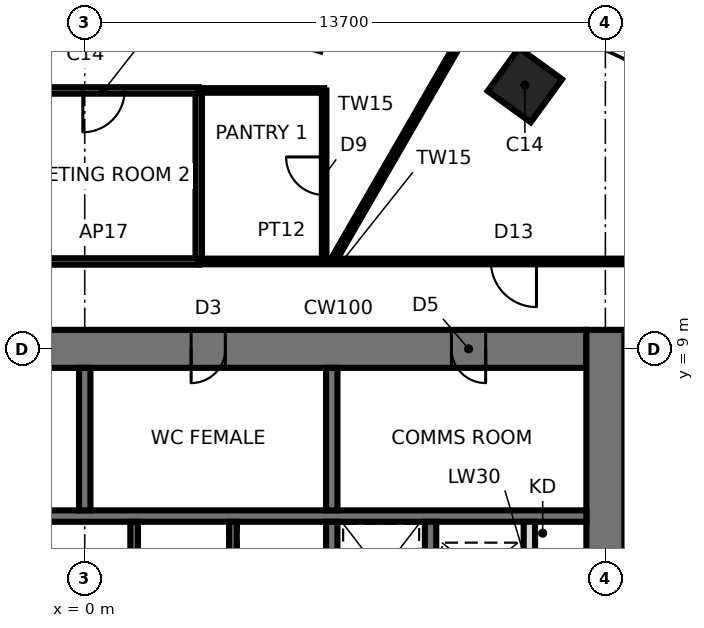
"""IFC4 building model, lengths in metres.
Left out: names, types, materials, properties, quantities, classifications, styles, units other than length and angle.
Written with IfcOpenShell. Run it as: python <this file> out.ifc"""

import sys

from ifc_helpers import new_model, si_unit, direction, frame, frame_2d, origin, origin_2d, place, context, subcontext, project, spatial, rectangle, extrude, element, fill, save


model = new_model("IFC4")
c1 = context("Model", 3, precision=1e-05, world=origin(), true_north=direction((0.0, 1.0)))
c2 = subcontext(c1, "Body", "Model", "MODEL_VIEW")
j1 = project(units=[si_unit("LENGTHUNIT", "METRE"), si_unit("PLANEANGLEUNIT", "RADIAN")], contexts=[c1])
p1 = place(None, origin())
s1 = spatial("IfcSite", under=j1, at=p1, CompositionType="ELEMENT")
p2 = place(p1, origin())
s2 = spatial("IfcBuilding", under=s1, at=p2, CompositionType="ELEMENT")
p3 = place(p2, frame((0.0, 0.0, 195.5)))
s3 = spatial("IfcBuildingStorey", under=s2, at=p3, CompositionType="ELEMENT", Elevation=195.5)
p4 = place(p3, frame((11.581, 15.94, 0.0), z_axis=(0.0, 0.0, 1.0), x_axis=(0.587785252292, 0.809016994375, 0.0)))
e1 = element("IfcColumn", 1, at=p4, inside=s3, PredefinedType="COLUMN", context=c2, shape_type="SweptSolid", body=[
    extrude(rectangle(XDim=1.4, YDim=1.4, at=origin_2d()), origin(), (0.0, 0.0, 1.0), 3.9),
])
p5 = place(p3, frame((13.2, 9.0, 0.0), z_axis=(0.0, 0.0, 1.0), x_axis=(-1.0, 0.0, 0.0)))
e2 = element("IfcWall", 2, at=p5, inside=s3, PredefinedType="SHEAR", context=c2, shape_type="SweptSolid", body=[
    extrude(rectangle(XDim=26.4, YDim=1.0, at=frame_2d((13.2, 0.0))), origin(), (0.0, 0.0, 1.0), 3.9),
])
p6 = place(p5, frame((2.65, 0.0, 0.0)))
e3 = element("IfcOpeningElement", 3, at=p6, cuts=e2, PredefinedType="OPENING", context=c2, shape_type="SweptSolid", body=[
    extrude(rectangle(XDim=0.9, YDim=2.1, at=frame_2d((0.45, 1.05))), frame((0.0, 0.51, 0.0), z_axis=(0.0, -1.0, 0.0), x_axis=(1.0, 0.0, 0.0)), (0.0, 0.0, 1.0), 1.02),
])
p7 = place(p5, frame((9.5, 0.0, 0.0)))
e4 = element("IfcOpeningElement", 4, at=p7, cuts=e2, PredefinedType="OPENING", context=c2, shape_type="SweptSolid", body=[
    extrude(rectangle(XDim=0.9, YDim=2.1, at=frame_2d((0.45, 1.05))), frame((0.0, 0.51, 0.0), z_axis=(0.0, -1.0, 0.0), x_axis=(1.0, 0.0, 0.0)), (0.0, 0.0, 1.0), 1.02),
])
p8 = place(p5, frame((16.0, 0.0, 0.0)))
e5 = element("IfcOpeningElement", 5, at=p8, cuts=e2, PredefinedType="OPENING", context=c2, shape_type="SweptSolid", body=[
    extrude(rectangle(XDim=0.9, YDim=2.1, at=frame_2d((0.45, 1.05))), frame((0.0, 0.51, 0.0), z_axis=(0.0, -1.0, 0.0), x_axis=(1.0, 0.0, 0.0)), (0.0, 0.0, 1.0), 1.02),
])
p9 = place(p5, frame((21.25, 0.0, 0.0)))
e6 = element("IfcOpeningElement", 6, at=p9, cuts=e2, PredefinedType="OPENING", context=c2, shape_type="SweptSolid", body=[
    extrude(rectangle(XDim=0.9, YDim=2.1, at=frame_2d((0.45, 1.05))), frame((0.0, 0.51, 0.0), z_axis=(0.0, -1.0, 0.0), x_axis=(1.0, 0.0, 0.0)), (0.0, 0.0, 1.0), 1.02),
])
p10 = place(p5, frame((24.8, 0.0, 0.0)))
e7 = element("IfcOpeningElement", 7, at=p10, cuts=e2, PredefinedType="OPENING", context=c2, shape_type="SweptSolid", body=[
    extrude(rectangle(XDim=1.0, YDim=2.1, at=frame_2d((0.5, 1.05))), frame((0.0, 0.51, 0.0), z_axis=(0.0, -1.0, 0.0), x_axis=(1.0, 0.0, 0.0)), (0.0, 0.0, 1.0), 1.02),
])
p11 = place(p3, frame((13.7, -9.5, 0.0), z_axis=(0.0, 0.0, 1.0), x_axis=(0.0, 1.0, 0.0)))
e8 = element("IfcWall", 8, at=p11, inside=s3, PredefinedType="SHEAR", context=c2, shape_type="SweptSolid", body=[
    extrude(rectangle(XDim=19.0, YDim=1.0, at=frame_2d((9.5, 0.0))), origin(), (0.0, 0.0, 1.0), 3.9),
])
p12 = place(p11, frame((8.6, 0.0, 0.0)))
e9 = element("IfcOpeningElement", 9, at=p12, cuts=e8, PredefinedType="OPENING", context=c2, shape_type="SweptSolid", body=[
    extrude(rectangle(XDim=1.8, YDim=2.4, at=frame_2d((0.9, 1.2))), frame((0.0, 0.51, 0.0), z_axis=(0.0, -1.0, 0.0), x_axis=(1.0, 0.0, 0.0)), (0.0, 0.0, 1.0), 1.02),
])
p13 = place(p3, frame((-13.2, 4.6, 0.0), z_axis=(0.0, 0.0, 1.0), x_axis=(1.0, 0.0, 0.0)))
e10 = element("IfcWall", 10, at=p13, inside=s3, PredefinedType="SHEAR", context=c2, shape_type="SweptSolid", body=[
    extrude(rectangle(XDim=26.4, YDim=0.3, at=frame_2d((13.2, 0.0))), origin(), (0.0, 0.0, 1.0), 3.9),
])
p14 = place(p3, frame((6.5, 1.75, 0.0), z_axis=(0.0, 0.0, 1.0), x_axis=(0.0, 1.0, 0.0)))
e11 = element("IfcWall", 11, at=p14, inside=s3, PredefinedType="SHEAR", context=c2, shape_type="SweptSolid", body=[
    extrude(rectangle(XDim=2.7, YDim=0.3, at=frame_2d((1.35, 0.0))), origin(), (0.0, 0.0, 1.0), 3.9),
])
p15 = place(p3, frame((6.5, 4.75, 0.0), z_axis=(0.0, 0.0, 1.0), x_axis=(0.0, 1.0, 0.0)))
e12 = element("IfcWall", 12, at=p15, inside=s3, PredefinedType="SHEAR", context=c2, shape_type="SweptSolid", body=[
    extrude(rectangle(XDim=3.75, YDim=0.3, at=frame_2d((1.875, 0.0))), origin(), (0.0, 0.0, 1.0), 3.9),
])
for number, where, z_axis, x_axis in (
    (13, (1.3, 1.75, 0.0), (0.0, 0.0, 1.0), (0.0, 1.0, 0.0)),
    (14, (3.9, 1.75, 0.0), (0.0, 0.0, 1.0), (0.0, 1.0, 0.0)),
):
    element("IfcWall", number, at=place(p3, frame(where, z_axis=z_axis, x_axis=x_axis)), inside=s3, PredefinedType="SHEAR", context=c2, shape_type="SweptSolid", body=[
        extrude(rectangle(XDim=2.7, YDim=0.2, at=frame_2d((1.35, 0.0))), origin(), (0.0, 0.0, 1.0), 3.9),
    ])
p16 = place(p3, frame((0.0, 4.75, 0.0), z_axis=(0.0, 0.0, 1.0), x_axis=(0.0, 1.0, 0.0)))
e15 = element("IfcWall", 15, at=p16, inside=s3, PredefinedType="SHEAR", context=c2, shape_type="SweptSolid", body=[
    extrude(rectangle(XDim=3.75, YDim=0.3, at=frame_2d((1.875, 0.0))), origin(), (0.0, 0.0, 1.0), 3.9),
])
p17 = place(p3, frame((9.1, 1.75, 0.0), z_axis=(0.0, 0.0, 1.0), x_axis=(0.0, 1.0, 0.0)))
e16 = element("IfcWall", 16, at=p17, inside=s3, PredefinedType="SHEAR", context=c2, shape_type="SweptSolid", body=[
    extrude(rectangle(XDim=2.7, YDim=0.3, at=frame_2d((1.35, 0.0))), origin(), (0.0, 0.0, 1.0), 3.9),
])
p18 = place(p3, frame((11.7, 1.75, 0.0), z_axis=(0.0, 0.0, 1.0), x_axis=(0.0, 1.0, 0.0)))
e17 = element("IfcWall", 17, at=p18, inside=s3, PredefinedType="SOLIDWALL", context=c2, shape_type="SweptSolid", body=[
    extrude(rectangle(XDim=2.7, YDim=0.3, at=frame_2d((1.35, 0.0))), origin(), (0.0, 0.0, 1.0), 3.74),
])
p19 = place(p3, frame((16.0, 11.3, 0.0), z_axis=(0.0, 0.0, 1.0), x_axis=(-1.0, 0.0, 0.0)))
e18 = element("IfcWall", 18, at=p19, inside=s3, PredefinedType="PARTITIONING", context=c2, shape_type="SweptSolid", body=[
    extrude(rectangle(XDim=13.0, YDim=0.15, at=frame_2d((6.5, 0.0))), origin(), (0.0, 0.0, 1.0), 3.74),
])
p20 = place(p19, frame((4.113, 0.0, 0.0)))
e19 = element("IfcOpeningElement", 19, at=p20, cuts=e18, PredefinedType="OPENING", context=c2, shape_type="SweptSolid", body=[
    extrude(rectangle(XDim=1.2, YDim=2.4, at=frame_2d((0.6, 1.2))), frame((0.0, 0.085, 0.0), z_axis=(0.0, -1.0, 0.0), x_axis=(1.0, 0.0, 0.0)), (0.0, 0.0, 1.0), 0.17),
])
p21 = place(p3, frame((6.524, 11.3, 0.0), z_axis=(0.0, 0.0, 1.0), x_axis=(0.499985955615, 0.866033512162, 0.0)))
e20 = element("IfcWall", 20, at=p21, inside=s3, PredefinedType="PARTITIONING", context=c2, shape_type="SweptSolid", body=[
    extrude(rectangle(XDim=8.02, YDim=0.15, at=frame_2d((4.01, 0.0))), origin(), (0.0, 0.0, 1.0), 3.74),
])
p22 = place(p3, frame((6.3, 11.3, 0.0), z_axis=(0.0, 0.0, 1.0), x_axis=(0.0, 1.0, 0.0)))
e21 = element("IfcWall", 21, at=p22, inside=s3, PredefinedType="PARTITIONING", context=c2, shape_type="SweptSolid", body=[
    extrude(rectangle(XDim=4.5, YDim=0.12, at=frame_2d((2.25, 0.0))), origin(), (0.0, 0.0, 1.0), 3.74),
])
p23 = place(p22, frame((1.75, 0.0, 0.0)))
e22 = element("IfcOpeningElement", 22, at=p23, cuts=e21, PredefinedType="OPENING", context=c2, shape_type="SweptSolid", body=[
    extrude(rectangle(XDim=1.0, YDim=2.4, at=frame_2d((0.5, 1.2))), frame((0.0, 0.07, 0.0), z_axis=(0.0, -1.0, 0.0), x_axis=(1.0, 0.0, 0.0)), (0.0, 0.0, 1.0), 0.14),
])
p24 = place(p3, frame((6.3, 15.8, 0.0), z_axis=(0.0, 0.0, 1.0), x_axis=(-1.0, 0.0, 0.0)))
e23 = element("IfcWall", 23, at=p24, inside=s3, PredefinedType="PARTITIONING", context=c2, shape_type="SweptSolid", body=[
    extrude(rectangle(XDim=3.3, YDim=0.12, at=frame_2d((1.65, 0.0))), origin(), (0.0, 0.0, 1.0), 3.74),
])
p25 = place(p3, frame((3.0, 15.8, 0.0), z_axis=(0.0, 0.0, 1.0), x_axis=(0.0, -1.0, 0.0)))
e24 = element("IfcWall", 24, at=p25, inside=s3, PredefinedType="PARTITIONING", context=c2, shape_type="SweptSolid", body=[
    extrude(rectangle(XDim=4.5, YDim=0.17, at=frame_2d((2.25, 0.0))), origin(), (0.0, 0.0, 1.0), 3.74),
])
p26 = place(p3, frame((-2.0, 11.3, 0.0), z_axis=(0.0, 0.0, 1.0), x_axis=(1.0, 0.0, 0.0)))
e25 = element("IfcWall", 25, at=p26, inside=s3, PredefinedType="PARTITIONING", context=c2, shape_type="SweptSolid", body=[
    extrude(rectangle(XDim=5.0, YDim=0.17, at=frame_2d((2.5, 0.0))), origin(), (0.0, 0.0, 1.0), 3.74),
])
p27 = place(p3, frame((3.0, 15.8, 0.0), z_axis=(0.0, 0.0, 1.0), x_axis=(-1.0, 0.0, 0.0)))
e26 = element("IfcWall", 26, at=p27, inside=s3, PredefinedType="PARTITIONING", context=c2, shape_type="SweptSolid", body=[
    extrude(rectangle(XDim=5.0, YDim=0.17, at=frame_2d((2.5, 0.0))), origin(), (0.0, 0.0, 1.0), 3.74),
])
p28 = place(p27, frame((1.95, 0.0, 0.0)))
e27 = element("IfcOpeningElement", 27, at=p28, cuts=e26, PredefinedType="OPENING", context=c2, shape_type="SweptSolid", body=[
    extrude(rectangle(XDim=1.1, YDim=2.4, at=frame_2d((0.55, 1.2))), frame((0.0, 0.095, 0.0), z_axis=(0.0, -1.0, 0.0), x_axis=(1.0, 0.0, 0.0)), (0.0, 0.0, 1.0), 0.19),
])
p29 = place(p6, origin())
e28 = element("IfcDoor", 28, at=p29, inside=s3, OperationType="SINGLE_SWING_LEFT", PredefinedType="DOOR", context=c2, shape_type="SweptSolid", body=[
    extrude(rectangle(XDim=0.82, YDim=2.06, at=frame_2d((0.45, 1.03))), frame((0.0, 0.025, 0.0), z_axis=(0.0, -1.0, 0.0), x_axis=(1.0, 0.0, 0.0)), (0.0, 0.0, 1.0), 0.05),
    extrude(rectangle(XDim=0.04, YDim=2.1, at=frame_2d((0.02, 1.05))), frame((0.0, 0.25, 0.0), z_axis=(0.0, -1.0, 0.0), x_axis=(1.0, 0.0, 0.0)), (0.0, 0.0, 1.0), 0.5),
    extrude(rectangle(XDim=0.04, YDim=2.1, at=frame_2d((0.88, 1.05))), frame((0.0, 0.25, 0.0), z_axis=(0.0, -1.0, 0.0), x_axis=(1.0, 0.0, 0.0)), (0.0, 0.0, 1.0), 0.5),
    extrude(rectangle(XDim=0.82, YDim=0.04, at=frame_2d((0.45, 2.08))), frame((0.0, 0.25, 0.0), z_axis=(0.0, -1.0, 0.0), x_axis=(1.0, 0.0, 0.0)), (0.0, 0.0, 1.0), 0.5),
])
fill(e3, e28)
p30 = place(p7, origin())
e29 = element("IfcDoor", 29, at=p30, inside=s3, OperationType="SINGLE_SWING_RIGHT", PredefinedType="DOOR", context=c2, shape_type="SweptSolid", body=[
    extrude(rectangle(XDim=0.82, YDim=2.06, at=frame_2d((0.45, 1.03))), frame((0.0, 0.025, 0.0), z_axis=(0.0, -1.0, 0.0), x_axis=(1.0, 0.0, 0.0)), (0.0, 0.0, 1.0), 0.05),
    extrude(rectangle(XDim=0.04, YDim=2.1, at=frame_2d((0.02, 1.05))), frame((0.0, 0.25, 0.0), z_axis=(0.0, -1.0, 0.0), x_axis=(1.0, 0.0, 0.0)), (0.0, 0.0, 1.0), 0.5),
    extrude(rectangle(XDim=0.04, YDim=2.1, at=frame_2d((0.88, 1.05))), frame((0.0, 0.25, 0.0), z_axis=(0.0, -1.0, 0.0), x_axis=(1.0, 0.0, 0.0)), (0.0, 0.0, 1.0), 0.5),
    extrude(rectangle(XDim=0.82, YDim=0.04, at=frame_2d((0.45, 2.08))), frame((0.0, 0.25, 0.0), z_axis=(0.0, -1.0, 0.0), x_axis=(1.0, 0.0, 0.0)), (0.0, 0.0, 1.0), 0.5),
])
fill(e4, e29)
p31 = place(p28, origin())
e30 = element("IfcDoor", 30, at=p31, inside=s3, OperationType="SINGLE_SWING_RIGHT", PredefinedType="DOOR", context=c2, shape_type="SweptSolid", body=[
    extrude(rectangle(XDim=1.1, YDim=2.4, at=frame_2d((0.55, 1.2))), frame((0.0, 0.025, 0.0), z_axis=(0.0, -1.0, 0.0), x_axis=(1.0, 0.0, 0.0)), (0.0, 0.0, 1.0), 0.05),
])
fill(e27, e30)
p32 = place(p23, origin())
e31 = element("IfcDoor", 31, at=p32, inside=s3, OperationType="SINGLE_SWING_RIGHT", PredefinedType="DOOR", context=c2, shape_type="SweptSolid", body=[
    extrude(rectangle(XDim=1.0, YDim=2.4, at=frame_2d((0.5, 1.2))), frame((0.0, 0.025, 0.0), z_axis=(0.0, -1.0, 0.0), x_axis=(1.0, 0.0, 0.0)), (0.0, 0.0, 1.0), 0.05),
])
fill(e22, e31)
p33 = place(p20, origin())
e32 = element("IfcDoor", 32, at=p33, inside=s3, OperationType="SINGLE_SWING_LEFT", PredefinedType="DOOR", context=c2, shape_type="SweptSolid", body=[
    extrude(rectangle(XDim=1.2, YDim=2.4, at=frame_2d((0.6, 1.2))), frame((0.0, 0.025, 0.0), z_axis=(0.0, -1.0, 0.0), x_axis=(1.0, 0.0, 0.0)), (0.0, 0.0, 1.0), 0.05),
])
fill(e19, e32)
save(model, sys.argv[1])
